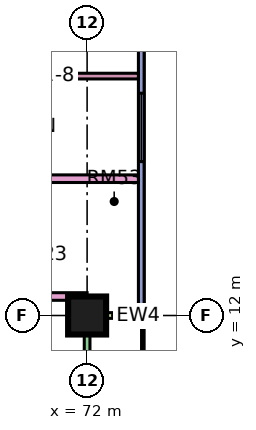
"""IFC4 building model, lengths in metres.
Left out: names, types, materials, properties, quantities, classifications, styles, units other than length and angle.
Written with IfcOpenShell. Run it as: python <this file> out.ifc"""

import sys

from ifc_helpers import new_model, si_unit, direction, frame, frame_2d, origin, origin_2d, place, context, subcontext, project, spatial, rectangle, extrude, element, fill, save


model = new_model("IFC4")
c1 = context("Model", 3, precision=1e-05, world=origin(), true_north=direction((0.0, 1.0)))
c2 = subcontext(c1, "Body", "Model", "MODEL_VIEW")
j1 = project(units=[si_unit("LENGTHUNIT", "METRE"), si_unit("PLANEANGLEUNIT", "RADIAN")], contexts=[c1])
p1 = place(None, origin())
s1 = spatial("IfcSite", under=j1, at=p1, CompositionType="ELEMENT")
p2 = place(p1, origin())
s2 = spatial("IfcBuilding", under=s1, at=p2, CompositionType="ELEMENT")
p3 = place(p2, frame((0.0, 0.0, 95.65)))
s3 = spatial("IfcBuildingStorey", under=s2, at=p3, CompositionType="ELEMENT", Elevation=95.65)
p4 = place(p3, frame((72.0, 12.0, 0.0), z_axis=(0.0, 0.0, 1.0), x_axis=(1.0, 0.0, 0.0)))
e1 = element("IfcColumn", 1, at=p4, inside=s3, PredefinedType="COLUMN", context=c2, shape_type="SweptSolid", body=[
    extrude(rectangle(XDim=1.0, YDim=1.0, at=origin_2d()), origin(), (0.0, 0.0, 1.0), 3.75),
])
p5 = place(p3, frame((72.0, 1.575, 0.0), z_axis=(0.0, 0.0, 1.0), x_axis=(0.0, 1.0, 0.0)))
e2 = element("IfcWall", 2, at=p5, inside=s3, PredefinedType="SOLIDWALL", context=c2, shape_type="SweptSolid", body=[
    extrude(rectangle(XDim=10.35, YDim=0.15, at=frame_2d((5.175, 0.0))), origin(), (0.0, 0.0, 1.0), 3.35),
])
p6 = place(p5, frame((4.012, 0.0, 0.0)))
e3 = element("IfcOpeningElement", 3, at=p6, cuts=e2, PredefinedType="OPENING", context=c2, shape_type="SweptSolid", body=[
    extrude(rectangle(XDim=1.8, YDim=2.4, at=frame_2d((0.9, 1.2))), frame((0.0, 0.085, 0.0), z_axis=(0.0, -1.0, 0.0), x_axis=(1.0, 0.0, 0.0)), (0.0, 0.0, 1.0), 0.17),
])
p7 = place(p3, frame((73.5, 12.0, 0.0), z_axis=(0.0, 0.0, 1.0), x_axis=(-1.0, 0.0, 0.0)))
e4 = element("IfcWall", 4, at=p7, inside=s3, PredefinedType="SOLIDWALL", context=c2, shape_type="SweptSolid", body=[
    extrude(rectangle(XDim=1.5, YDim=0.15, at=frame_2d((0.75, 0.0))), origin(), (0.0, 0.0, 1.0), 3.35),
])
p8 = place(p3, frame((73.425, 12.075, 0.0), z_axis=(0.0, 0.0, 1.0), x_axis=(0.0, 1.0, 0.0)))
e5 = element("IfcWall", 5, at=p8, inside=s3, PredefinedType="SOLIDWALL", context=c2, shape_type="SweptSolid", body=[
    extrude(rectangle(XDim=10.425, YDim=0.15, at=frame_2d((5.212, 0.0))), origin(), (0.0, 0.0, 1.0), 3.35),
])
p9 = place(p8, frame((3.975, 0.0, 0.45)))
e6 = element("IfcOpeningElement", 6, at=p9, cuts=e5, PredefinedType="OPENING", context=c2, shape_type="SweptSolid", body=[
    extrude(rectangle(XDim=1.8, YDim=2.4, at=frame_2d((0.9, 1.2))), frame((0.0, 0.085, 0.0), z_axis=(0.0, -1.0, 0.0), x_axis=(1.0, 0.0, 0.0)), (0.0, 0.0, 1.0), 0.17),
])
p10 = place(p8, frame((8.025, 0.0, 0.45)))
e7 = element("IfcOpeningElement", 7, at=p10, cuts=e5, PredefinedType="OPENING", context=c2, shape_type="SweptSolid", body=[
    extrude(rectangle(XDim=1.8, YDim=2.4, at=frame_2d((0.9, 1.2))), frame((0.0, 0.085, 0.0), z_axis=(0.0, -1.0, 0.0), x_axis=(1.0, 0.0, 0.0)), (0.0, 0.0, 1.0), 0.17),
])
p11 = place(p3, frame((51.225, 15.6, 0.0), z_axis=(0.0, 0.0, 1.0), x_axis=(1.0, 0.0, 0.0)))
e8 = element("IfcWall", 8, at=p11, inside=s3, PredefinedType="PARTITIONING", context=c2, shape_type="SweptSolid", body=[
    extrude(rectangle(XDim=22.125, YDim=0.2, at=frame_2d((11.062, 0.0))), origin(), (0.0, 0.0, 1.0), 3.35),
])
p12 = place(p11, frame((6.125, 0.0, 0.0)))
e9 = element("IfcOpeningElement", 9, at=p12, cuts=e8, PredefinedType="OPENING", context=c2, shape_type="SweptSolid", body=[
    extrude(rectangle(XDim=1.0, YDim=2.1, at=frame_2d((0.5, 1.05))), frame((0.0, 0.11, 0.0), z_axis=(0.0, -1.0, 0.0), x_axis=(1.0, 0.0, 0.0)), (0.0, 0.0, 1.0), 0.22),
])
p13 = place(p11, frame((0.875, 0.0, 0.0)))
e10 = element("IfcOpeningElement", 10, at=p13, cuts=e8, PredefinedType="OPENING", context=c2, shape_type="SweptSolid", body=[
    extrude(rectangle(XDim=1.0, YDim=2.1, at=frame_2d((0.5, 1.05))), frame((0.0, 0.11, 0.0), z_axis=(0.0, -1.0, 0.0), x_axis=(1.0, 0.0, 0.0)), (0.0, 0.0, 1.0), 0.22),
])
p14 = place(p3, frame((59.325, 18.3, 0.0), z_axis=(0.0, 0.0, 1.0), x_axis=(1.0, 0.0, 0.0)))
e11 = element("IfcWall", 11, at=p14, inside=s3, PredefinedType="PARTITIONING", context=c2, shape_type="SweptSolid", body=[
    extrude(rectangle(XDim=14.025, YDim=0.15, at=frame_2d((7.013, 0.0))), origin(), (0.0, 0.0, 1.0), 3.35),
])
p15 = place(p14, frame((4.575, 0.0, 0.0)))
e12 = element("IfcOpeningElement", 12, at=p15, cuts=e11, PredefinedType="OPENING", context=c2, shape_type="SweptSolid", body=[
    extrude(rectangle(XDim=0.8, YDim=2.1, at=frame_2d((0.4, 1.05))), frame((0.0, 0.085, 0.0), z_axis=(0.0, -1.0, 0.0), x_axis=(1.0, 0.0, 0.0)), (0.0, 0.0, 1.0), 0.17),
])
p16 = place(p14, frame((9.375, 0.0, 0.0)))
e13 = element("IfcOpeningElement", 13, at=p16, cuts=e11, PredefinedType="OPENING", context=c2, shape_type="SweptSolid", body=[
    extrude(rectangle(XDim=0.9, YDim=2.1, at=frame_2d((0.45, 1.05))), frame((0.0, 0.085, 0.0), z_axis=(0.0, -1.0, 0.0), x_axis=(1.0, 0.0, 0.0)), (0.0, 0.0, 1.0), 0.17),
])
p17 = place(p14, frame((1.125, 0.0, 0.0)))
e14 = element("IfcOpeningElement", 14, at=p17, cuts=e11, PredefinedType="OPENING", context=c2, shape_type="SweptSolid", body=[
    extrude(rectangle(XDim=0.8, YDim=2.1, at=frame_2d((0.4, 1.05))), frame((0.0, 0.085, 0.0), z_axis=(0.0, -1.0, 0.0), x_axis=(1.0, 0.0, 0.0)), (0.0, 0.0, 1.0), 0.17),
])
p18 = place(p3, frame((65.7, 12.5, 0.0), z_axis=(0.0, 0.0, 1.0), x_axis=(1.0, 0.0, 0.0)))
e15 = element("IfcWall", 15, at=p18, inside=s3, PredefinedType="PARTITIONING", context=c2, shape_type="SweptSolid", body=[
    extrude(rectangle(XDim=6.3, YDim=0.2, at=frame_2d((3.15, 0.0))), origin(), (0.0, 0.0, 1.0), 3.35),
])
p19 = place(p18, frame((4.2, 0.0, 0.0)))
e16 = element("IfcOpeningElement", 16, at=p19, cuts=e15, PredefinedType="OPENING", context=c2, shape_type="SweptSolid", body=[
    extrude(rectangle(XDim=1.0, YDim=2.1, at=frame_2d((0.5, 1.05))), frame((0.0, 0.11, 0.0), z_axis=(0.0, -1.0, 0.0), x_axis=(1.0, 0.0, 0.0)), (0.0, 0.0, 1.0), 0.22),
])
p20 = place(p9, origin())
e17 = element("IfcWindow", 17, at=p20, inside=s3, PartitioningType="SINGLE_PANEL", PredefinedType="WINDOW", context=c2, shape_type="SweptSolid", body=[
    extrude(rectangle(XDim=1.8, YDim=2.4, at=frame_2d((0.9, 1.2))), frame((0.0, 0.03, 0.0), z_axis=(0.0, -1.0, 0.0), x_axis=(1.0, 0.0, 0.0)), (0.0, 0.0, 1.0), 0.06),
])
fill(e6, e17)
save(model, sys.argv[1])
